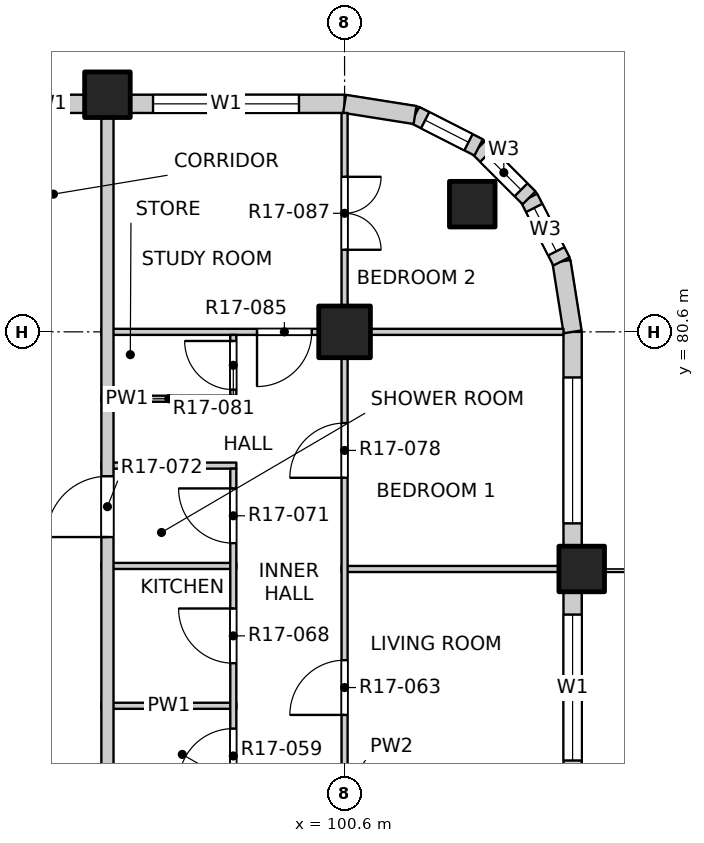
"""IFC4 building model, lengths in metres.
Left out: names, types, materials, properties, quantities, classifications, styles, units other than length and angle.
Written with IfcOpenShell. Run it as: python <this file> out.ifc"""

import sys

from ifc_helpers import new_model, si_unit, direction, frame, frame_2d, origin, origin_2d, place, context, subcontext, project, spatial, rectangle, extrude, element, fill, save


model = new_model("IFC4")
c1 = context("Model", 3, precision=1e-05, world=origin(), true_north=direction((0.0, 1.0)))
c2 = subcontext(c1, "Body", "Model", "MODEL_VIEW")
j1 = project(units=[si_unit("LENGTHUNIT", "METRE"), si_unit("PLANEANGLEUNIT", "RADIAN")], contexts=[c1])
p1 = place(None, origin())
s1 = spatial("IfcSite", under=j1, at=p1, CompositionType="ELEMENT")
p2 = place(p1, origin())
s2 = spatial("IfcBuilding", under=s1, at=p2, CompositionType="ELEMENT")
p3 = place(p2, frame((0.0, 0.0, 182.6)))
s3 = spatial("IfcBuildingStorey", under=s2, at=p3, CompositionType="ELEMENT", Elevation=182.6)
for number, where, z_axis, x_axis in (
    (1, (102.7, 82.7, -0.25), (0.0, 0.0, 1.0), (1.0, 0.0, 0.0)),
    (2, (104.5, 76.7, -0.25), (0.0, 0.0, 1.0), (1.0, 0.0, 0.0)),
    (3, (96.7, 84.5, -0.25), (0.0, 0.0, 1.0), (1.0, 0.0, 0.0)),
):
    element("IfcColumn", number, at=place(p3, frame(where, z_axis=z_axis, x_axis=x_axis)), inside=s3, PredefinedType="COLUMN", context=c2, shape_type="SweptSolid", body=[
        extrude(rectangle(XDim=0.75, YDim=0.75, at=origin_2d()), origin(), (0.0, 0.0, 1.0), 3.4),
    ])
p4 = place(p3, frame((100.6, 80.6, -0.25), z_axis=(0.0, 0.0, 1.0), x_axis=(1.0, 0.0, 0.0)))
e4 = element("IfcColumn", 4, at=p4, inside=s3, PredefinedType="COLUMN", context=c2, shape_type="SweptSolid", body=[
    extrude(rectangle(XDim=0.85, YDim=0.85, at=origin_2d()), origin(), (0.0, 0.0, 1.0), 3.4),
])
p5 = place(p3, frame((104.35, 69.275, 0.0), z_axis=(0.0, 0.0, 1.0), x_axis=(0.0, 1.0, 0.0)))
e5 = element("IfcWall", 5, at=p5, inside=s3, PredefinedType="SOLIDWALL", context=c2, shape_type="SweptSolid", body=[
    extrude(rectangle(XDim=7.05, YDim=0.3, at=frame_2d((3.525, 0.0))), origin(), (0.0, 0.0, 1.0), 2.7),
])
p6 = place(p5, frame((0.675, 0.0, 0.0)))
e6 = element("IfcOpeningElement", 6, at=p6, cuts=e5, PredefinedType="OPENING", context=c2, shape_type="SweptSolid", body=[
    extrude(rectangle(XDim=1.8, YDim=2.4, at=frame_2d((0.9, 1.2))), frame((0.0, 0.16, 0.0), z_axis=(0.0, -1.0, 0.0), x_axis=(1.0, 0.0, 0.0)), (0.0, 0.0, 1.0), 0.32),
])
p7 = place(p5, frame((4.275, 0.0, 0.9)))
e7 = element("IfcOpeningElement", 7, at=p7, cuts=e5, PredefinedType="OPENING", context=c2, shape_type="SweptSolid", body=[
    extrude(rectangle(XDim=2.4, YDim=1.8, at=frame_2d((1.2, 0.9))), frame((0.0, 0.16, 0.0), z_axis=(0.0, -1.0, 0.0), x_axis=(1.0, 0.0, 0.0)), (0.0, 0.0, 1.0), 0.32),
])
p8 = place(p3, frame((104.35, 77.075, 0.0), z_axis=(0.0, 0.0, 1.0), x_axis=(0.0, 1.0, 0.0)))
e8 = element("IfcWall", 8, at=p8, inside=s3, PredefinedType="SOLIDWALL", context=c2, shape_type="SweptSolid", body=[
    extrude(rectangle(XDim=3.525, YDim=0.3, at=frame_2d((1.763, 0.0))), origin(), (0.0, 0.0, 1.0), 2.7),
])
p9 = place(p8, frame((0.375, 0.0, 0.9)))
e9 = element("IfcOpeningElement", 9, at=p9, cuts=e8, PredefinedType="OPENING", context=c2, shape_type="SweptSolid", body=[
    extrude(rectangle(XDim=2.4, YDim=1.8, at=frame_2d((1.2, 0.9))), frame((0.0, 0.16, 0.0), z_axis=(0.0, -1.0, 0.0), x_axis=(1.0, 0.0, 0.0)), (0.0, 0.0, 1.0), 0.32),
])
p10 = place(p3, frame((95.025, 84.35, 0.0), z_axis=(0.0, 0.0, 1.0), x_axis=(1.0, 0.0, 0.0)))
e10 = element("IfcWall", 10, at=p10, inside=s3, PredefinedType="SOLIDWALL", context=c2, shape_type="SweptSolid", body=[
    extrude(rectangle(XDim=1.3, YDim=0.3, at=frame_2d((0.65, 0.0))), origin(), (0.0, 0.0, 1.0), 2.7),
])
p11 = place(p3, frame((97.075, 84.35, 0.0), z_axis=(0.0, 0.0, 1.0), x_axis=(1.0, 0.0, 0.0)))
e11 = element("IfcWall", 11, at=p11, inside=s3, PredefinedType="SOLIDWALL", context=c2, shape_type="SweptSolid", body=[
    extrude(rectangle(XDim=3.525, YDim=0.3, at=frame_2d((1.763, 0.0))), origin(), (0.0, 0.0, 1.0), 2.7),
])
p12 = place(p11, frame((0.375, 0.0, 0.9)))
e12 = element("IfcOpeningElement", 12, at=p12, cuts=e11, PredefinedType="OPENING", context=c2, shape_type="SweptSolid", body=[
    extrude(rectangle(XDim=2.4, YDim=1.8, at=frame_2d((1.2, 0.9))), frame((0.0, 0.16, 0.0), z_axis=(0.0, -1.0, 0.0), x_axis=(1.0, 0.0, 0.0)), (0.0, 0.0, 1.0), 0.32),
])
p13 = place(p3, frame((104.35, 80.6, 0.0), z_axis=(0.0, 0.0, 1.0), x_axis=(-0.156496880861, 0.987678452879, 0.0)))
e13 = element("IfcWall", 13, at=p13, inside=s3, PredefinedType="SOLIDWALL", context=c2, shape_type="SweptSolid", body=[
    extrude(rectangle(XDim=1.173, YDim=0.3, at=frame_2d((0.586, 0.0))), origin(), (0.0, 0.0, 1.0), 2.7),
])
p14 = place(p3, frame((104.167, 81.759, 0.0), z_axis=(0.0, 0.0, 1.0), x_axis=(-0.454025524128, 0.890988677504, 0.0)))
e14 = element("IfcWall", 14, at=p14, inside=s3, PredefinedType="SOLIDWALL", context=c2, shape_type="SweptSolid", body=[
    extrude(rectangle(XDim=1.173, YDim=0.3, at=frame_2d((0.587, 0.0))), origin(), (0.0, 0.0, 1.0), 2.7),
])
p15 = place(p14, frame((0.187, 0.0, 0.9)))
e15 = element("IfcOpeningElement", 15, at=p15, cuts=e14, PredefinedType="OPENING", context=c2, shape_type="SweptSolid", body=[
    extrude(rectangle(XDim=0.8, YDim=1.2, at=frame_2d((0.4, 0.6))), frame((0.0, 0.16, 0.0), z_axis=(0.0, -1.0, 0.0), x_axis=(1.0, 0.0, 0.0)), (0.0, 0.0, 1.0), 0.32),
])
p16 = place(p3, frame((103.634, 82.804, 0.0), z_axis=(0.0, 0.0, 1.0), x_axis=(-0.707106781187, 0.707106781187, 0.0)))
e16 = element("IfcWall", 16, at=p16, inside=s3, PredefinedType="SOLIDWALL", context=c2, shape_type="SweptSolid", body=[
    extrude(rectangle(XDim=1.173, YDim=0.3, at=frame_2d((0.586, 0.0))), origin(), (0.0, 0.0, 1.0), 2.7),
])
p17 = place(p16, frame((0.187, 0.0, 0.9)))
e17 = element("IfcOpeningElement", 17, at=p17, cuts=e16, PredefinedType="OPENING", context=c2, shape_type="SweptSolid", body=[
    extrude(rectangle(XDim=0.8, YDim=1.2, at=frame_2d((0.4, 0.6))), frame((0.0, 0.16, 0.0), z_axis=(0.0, -1.0, 0.0), x_axis=(1.0, 0.0, 0.0)), (0.0, 0.0, 1.0), 0.32),
])
p18 = place(p3, frame((102.804, 83.634, 0.0), z_axis=(0.0, 0.0, 1.0), x_axis=(-0.890988677504, 0.454025524128, 0.0)))
e18 = element("IfcWall", 18, at=p18, inside=s3, PredefinedType="SOLIDWALL", context=c2, shape_type="SweptSolid", body=[
    extrude(rectangle(XDim=1.173, YDim=0.3, at=frame_2d((0.587, 0.0))), origin(), (0.0, 0.0, 1.0), 2.7),
])
p19 = place(p18, frame((0.187, 0.0, 0.9)))
e19 = element("IfcOpeningElement", 19, at=p19, cuts=e18, PredefinedType="OPENING", context=c2, shape_type="SweptSolid", body=[
    extrude(rectangle(XDim=0.8, YDim=1.2, at=frame_2d((0.4, 0.6))), frame((0.0, 0.16, 0.0), z_axis=(0.0, -1.0, 0.0), x_axis=(1.0, 0.0, 0.0)), (0.0, 0.0, 1.0), 0.32),
])
p20 = place(p3, frame((101.759, 84.167, 0.0), z_axis=(0.0, 0.0, 1.0), x_axis=(-0.987678452879, 0.156496880861, 0.0)))
e20 = element("IfcWall", 20, at=p20, inside=s3, PredefinedType="SOLIDWALL", context=c2, shape_type="SweptSolid", body=[
    extrude(rectangle(XDim=1.173, YDim=0.3, at=frame_2d((0.586, 0.0))), origin(), (0.0, 0.0, 1.0), 2.7),
])
p21 = place(p3, frame((96.6, 74.45, 0.0), z_axis=(0.0, 0.0, 1.0), x_axis=(1.0, 0.0, 0.0)))
e21 = element("IfcWall", 21, at=p21, inside=s3, PredefinedType="PARTITIONING", context=c2, shape_type="SweptSolid", body=[
    extrude(rectangle(XDim=2.22, YDim=0.1, at=frame_2d((1.11, 0.0))), origin(), (0.0, 0.0, 1.0), 3.15),
])
p22 = place(p3, frame((100.55, 76.7, 0.0), z_axis=(0.0, 0.0, 1.0), x_axis=(1.0, 0.0, 0.0)))
e22 = element("IfcWall", 22, at=p22, inside=s3, PredefinedType="PARTITIONING", context=c2, shape_type="SweptSolid", body=[
    extrude(rectangle(XDim=3.65, YDim=0.1, at=frame_2d((1.825, 0.0))), origin(), (0.0, 0.0, 1.0), 2.55),
])
p23 = place(p3, frame((96.6, 76.75, 0.0), z_axis=(0.0, 0.0, 1.0), x_axis=(1.0, 0.0, 0.0)))
e23 = element("IfcWall", 23, at=p23, inside=s3, PredefinedType="PARTITIONING", context=c2, shape_type="SweptSolid", body=[
    extrude(rectangle(XDim=2.22, YDim=0.1, at=frame_2d((1.11, 0.0))), origin(), (0.0, 0.0, 1.0), 2.55),
])
for number, where, z_axis, x_axis in (
    (24, (96.6, 78.4, 0.0), (0.0, 0.0, 1.0), (1.0, 0.0, 0.0)),
    (25, (96.6, 79.5, 0.0), (0.0, 0.0, 1.0), (1.0, 0.0, 0.0)),
):
    element("IfcWall", number, at=place(p3, frame(where, z_axis=z_axis, x_axis=x_axis)), inside=s3, PredefinedType="PARTITIONING", context=c2, shape_type="SweptSolid", body=[
        extrude(rectangle(XDim=2.22, YDim=0.1, at=frame_2d((1.11, 0.0))), origin(), (0.0, 0.0, 1.0), 3.15),
    ])
p24 = place(p3, frame((96.6, 80.6, 0.0), z_axis=(0.0, 0.0, 1.0), x_axis=(1.0, 0.0, 0.0)))
e26 = element("IfcWall", 26, at=p24, inside=s3, PredefinedType="PARTITIONING", context=c2, shape_type="SweptSolid", body=[
    extrude(rectangle(XDim=7.6, YDim=0.1, at=frame_2d((3.8, 0.0))), origin(), (0.0, 0.0, 1.0), 3.15),
])
p25 = place(p24, frame((2.56, 0.0, 0.0)))
e27 = element("IfcOpeningElement", 27, at=p25, cuts=e26, PredefinedType="OPENING", context=c2, shape_type="SweptSolid", body=[
    extrude(rectangle(XDim=0.9, YDim=2.1, at=frame_2d((0.45, 1.05))), frame((0.0, 0.06, 0.0), z_axis=(0.0, -1.0, 0.0), x_axis=(1.0, 0.0, 0.0)), (0.0, 0.0, 1.0), 0.12),
])
p26 = place(p3, frame((96.7, 49.5, 0.0), z_axis=(0.0, 0.0, 1.0), x_axis=(0.0, 1.0, 0.0)))
e28 = element("IfcWall", 28, at=p26, inside=s3, PredefinedType="PARTITIONING", context=c2, shape_type="SweptSolid", body=[
    extrude(rectangle(XDim=34.7, YDim=0.2, at=frame_2d((17.35, 0.0))), origin(), (0.0, 0.0, 1.0), 3.15),
])
p27 = place(p26, frame((6.875, 0.0, 0.0)))
e29 = element("IfcOpeningElement", 29, at=p27, cuts=e28, PredefinedType="OPENING", context=c2, shape_type="SweptSolid", body=[
    extrude(rectangle(XDim=1.0, YDim=2.1, at=frame_2d((0.5, 1.05))), frame((0.0, 0.11, 0.0), z_axis=(0.0, -1.0, 0.0), x_axis=(1.0, 0.0, 0.0)), (0.0, 0.0, 1.0), 0.22),
])
p28 = place(p26, frame((21.775, 0.0, 0.0)))
e30 = element("IfcOpeningElement", 30, at=p28, cuts=e28, PredefinedType="OPENING", context=c2, shape_type="SweptSolid", body=[
    extrude(rectangle(XDim=1.0, YDim=2.1, at=frame_2d((0.5, 1.05))), frame((0.0, 0.11, 0.0), z_axis=(0.0, -1.0, 0.0), x_axis=(1.0, 0.0, 0.0)), (0.0, 0.0, 1.0), 0.22),
])
p29 = place(p26, frame((27.725, 0.0, 0.0)))
e31 = element("IfcOpeningElement", 31, at=p29, cuts=e28, PredefinedType="OPENING", context=c2, shape_type="SweptSolid", body=[
    extrude(rectangle(XDim=1.0, YDim=2.1, at=frame_2d((0.5, 1.05))), frame((0.0, 0.11, 0.0), z_axis=(0.0, -1.0, 0.0), x_axis=(1.0, 0.0, 0.0)), (0.0, 0.0, 1.0), 0.22),
])
p30 = place(p3, frame((98.77, 71.15, 0.0), z_axis=(0.0, 0.0, 1.0), x_axis=(0.0, 1.0, 0.0)))
e32 = element("IfcWall", 32, at=p30, inside=s3, PredefinedType="PARTITIONING", context=c2, shape_type="SweptSolid", body=[
    extrude(rectangle(XDim=7.2, YDim=0.1, at=frame_2d((3.6, 0.0))), origin(), (0.0, 0.0, 1.0), 3.15),
])
p31 = place(p30, frame((0.4, 0.0, 0.0)))
e33 = element("IfcOpeningElement", 33, at=p31, cuts=e32, PredefinedType="OPENING", context=c2, shape_type="SweptSolid", body=[
    extrude(rectangle(XDim=0.8, YDim=2.1, at=frame_2d((0.4, 1.05))), frame((0.0, 0.06, 0.0), z_axis=(0.0, -1.0, 0.0), x_axis=(1.0, 0.0, 0.0)), (0.0, 0.0, 1.0), 0.12),
])
p32 = place(p30, frame((2.025, 0.0, 0.0)))
e34 = element("IfcOpeningElement", 34, at=p32, cuts=e32, PredefinedType="OPENING", context=c2, shape_type="SweptSolid", body=[
    extrude(rectangle(XDim=0.9, YDim=2.1, at=frame_2d((0.45, 1.05))), frame((0.0, 0.06, 0.0), z_axis=(0.0, -1.0, 0.0), x_axis=(1.0, 0.0, 0.0)), (0.0, 0.0, 1.0), 0.12),
])
p33 = place(p30, frame((4.0, 0.0, 0.0)))
e35 = element("IfcOpeningElement", 35, at=p33, cuts=e32, PredefinedType="OPENING", context=c2, shape_type="SweptSolid", body=[
    extrude(rectangle(XDim=0.9, YDim=2.1, at=frame_2d((0.45, 1.05))), frame((0.0, 0.06, 0.0), z_axis=(0.0, -1.0, 0.0), x_axis=(1.0, 0.0, 0.0)), (0.0, 0.0, 1.0), 0.12),
])
p34 = place(p30, frame((5.975, 0.0, 0.0)))
e36 = element("IfcOpeningElement", 36, at=p34, cuts=e32, PredefinedType="OPENING", context=c2, shape_type="SweptSolid", body=[
    extrude(rectangle(XDim=0.9, YDim=2.1, at=frame_2d((0.45, 1.05))), frame((0.0, 0.06, 0.0), z_axis=(0.0, -1.0, 0.0), x_axis=(1.0, 0.0, 0.0)), (0.0, 0.0, 1.0), 0.12),
])
p35 = place(p3, frame((98.77, 79.55, 0.0), z_axis=(0.0, 0.0, 1.0), x_axis=(0.0, 1.0, 0.0)))
e37 = element("IfcWall", 37, at=p35, inside=s3, PredefinedType="PARTITIONING", context=c2, shape_type="SweptSolid", body=[
    extrude(rectangle(XDim=1.0, YDim=0.1, at=frame_2d((0.5, 0.0))), origin(), (0.0, 0.0, 1.0), 3.15),
])
p36 = place(p35, frame((0.1, 0.0, 0.0)))
e38 = element("IfcOpeningElement", 38, at=p36, cuts=e37, PredefinedType="OPENING", context=c2, shape_type="SweptSolid", body=[
    extrude(rectangle(XDim=0.8, YDim=2.1, at=frame_2d((0.4, 1.05))), frame((0.0, 0.06, 0.0), z_axis=(0.0, -1.0, 0.0), x_axis=(1.0, 0.0, 0.0)), (0.0, 0.0, 1.0), 0.12),
])
p37 = place(p3, frame((100.6, 45.8, 0.0), z_axis=(0.0, 0.0, 1.0), x_axis=(0.0, 1.0, 0.0)))
e39 = element("IfcWall", 39, at=p37, inside=s3, PredefinedType="PARTITIONING", context=c2, shape_type="SweptSolid", body=[
    extrude(rectangle(XDim=38.4, YDim=0.1, at=frame_2d((19.2, 0.0))), origin(), (0.0, 0.0, 1.0), 3.15),
])
p38 = place(p37, frame((1.05, 0.0, 0.0)))
e40 = element("IfcOpeningElement", 40, at=p38, cuts=e39, PredefinedType="OPENING", context=c2, shape_type="SweptSolid", body=[
    extrude(rectangle(XDim=1.2, YDim=2.1, at=frame_2d((0.6, 1.05))), frame((0.0, 0.06, 0.0), z_axis=(0.0, -1.0, 0.0), x_axis=(1.0, 0.0, 0.0)), (0.0, 0.0, 1.0), 0.12),
])
p39 = place(p37, frame((5.1, 0.0, 0.0)))
e41 = element("IfcOpeningElement", 41, at=p39, cuts=e39, PredefinedType="OPENING", context=c2, shape_type="SweptSolid", body=[
    extrude(rectangle(XDim=0.9, YDim=2.1, at=frame_2d((0.45, 1.05))), frame((0.0, 0.06, 0.0), z_axis=(0.0, -1.0, 0.0), x_axis=(1.0, 0.0, 0.0)), (0.0, 0.0, 1.0), 0.12),
])
p40 = place(p37, frame((9.0, 0.0, 0.0)))
e42 = element("IfcOpeningElement", 42, at=p40, cuts=e39, PredefinedType="OPENING", context=c2, shape_type="SweptSolid", body=[
    extrude(rectangle(XDim=0.9, YDim=2.1, at=frame_2d((0.45, 1.05))), frame((0.0, 0.06, 0.0), z_axis=(0.0, -1.0, 0.0), x_axis=(1.0, 0.0, 0.0)), (0.0, 0.0, 1.0), 0.12),
])
p41 = place(p37, frame((12.9, 0.0, 0.0)))
e43 = element("IfcOpeningElement", 43, at=p41, cuts=e39, PredefinedType="OPENING", context=c2, shape_type="SweptSolid", body=[
    extrude(rectangle(XDim=0.9, YDim=2.1, at=frame_2d((0.45, 1.05))), frame((0.0, 0.06, 0.0), z_axis=(0.0, -1.0, 0.0), x_axis=(1.0, 0.0, 0.0)), (0.0, 0.0, 1.0), 0.12),
])
p42 = place(p37, frame((19.725, 0.0, 0.0)))
e44 = element("IfcOpeningElement", 44, at=p42, cuts=e39, PredefinedType="OPENING", context=c2, shape_type="SweptSolid", body=[
    extrude(rectangle(XDim=1.2, YDim=2.1, at=frame_2d((0.6, 1.05))), frame((0.0, 0.06, 0.0), z_axis=(0.0, -1.0, 0.0), x_axis=(1.0, 0.0, 0.0)), (0.0, 0.0, 1.0), 0.12),
])
p43 = place(p37, frame((24.6, 0.0, 0.0)))
e45 = element("IfcOpeningElement", 45, at=p43, cuts=e39, PredefinedType="OPENING", context=c2, shape_type="SweptSolid", body=[
    extrude(rectangle(XDim=0.9, YDim=2.1, at=frame_2d((0.45, 1.05))), frame((0.0, 0.06, 0.0), z_axis=(0.0, -1.0, 0.0), x_axis=(1.0, 0.0, 0.0)), (0.0, 0.0, 1.0), 0.12),
])
p44 = place(p37, frame((28.5, 0.0, 0.0)))
e46 = element("IfcOpeningElement", 46, at=p44, cuts=e39, PredefinedType="OPENING", context=c2, shape_type="SweptSolid", body=[
    extrude(rectangle(XDim=0.9, YDim=2.1, at=frame_2d((0.45, 1.05))), frame((0.0, 0.06, 0.0), z_axis=(0.0, -1.0, 0.0), x_axis=(1.0, 0.0, 0.0)), (0.0, 0.0, 1.0), 0.12),
])
p45 = place(p37, frame((32.4, 0.0, 0.0)))
e47 = element("IfcOpeningElement", 47, at=p45, cuts=e39, PredefinedType="OPENING", context=c2, shape_type="SweptSolid", body=[
    extrude(rectangle(XDim=0.9, YDim=2.1, at=frame_2d((0.45, 1.05))), frame((0.0, 0.06, 0.0), z_axis=(0.0, -1.0, 0.0), x_axis=(1.0, 0.0, 0.0)), (0.0, 0.0, 1.0), 0.12),
])
p46 = place(p37, frame((36.15, 0.0, 0.0)))
e48 = element("IfcOpeningElement", 48, at=p46, cuts=e39, PredefinedType="OPENING", context=c2, shape_type="SweptSolid", body=[
    extrude(rectangle(XDim=1.2, YDim=2.1, at=frame_2d((0.6, 1.05))), frame((0.0, 0.06, 0.0), z_axis=(0.0, -1.0, 0.0), x_axis=(1.0, 0.0, 0.0)), (0.0, 0.0, 1.0), 0.12),
])
p47 = place(p7, origin())
e49 = element("IfcWindow", 49, at=p47, inside=s3, PartitioningType="DOUBLE_PANEL_VERTICAL", PredefinedType="WINDOW", context=c2, shape_type="SweptSolid", body=[
    extrude(rectangle(XDim=2.4, YDim=1.8, at=frame_2d((1.2, 0.9))), frame((0.0, 0.03, 0.0), z_axis=(0.0, -1.0, 0.0), x_axis=(1.0, 0.0, 0.0)), (0.0, 0.0, 1.0), 0.06),
])
fill(e7, e49)
p48 = place(p9, origin())
e50 = element("IfcWindow", 50, at=p48, inside=s3, PartitioningType="DOUBLE_PANEL_VERTICAL", PredefinedType="WINDOW", context=c2, shape_type="SweptSolid", body=[
    extrude(rectangle(XDim=2.4, YDim=1.8, at=frame_2d((1.2, 0.9))), frame((0.0, 0.03, 0.0), z_axis=(0.0, -1.0, 0.0), x_axis=(1.0, 0.0, 0.0)), (0.0, 0.0, 1.0), 0.06),
])
fill(e9, e50)
p49 = place(p12, origin())
e51 = element("IfcWindow", 51, at=p49, inside=s3, PartitioningType="DOUBLE_PANEL_VERTICAL", PredefinedType="WINDOW", context=c2, shape_type="SweptSolid", body=[
    extrude(rectangle(XDim=2.4, YDim=1.8, at=frame_2d((1.2, 0.9))), frame((0.0, 0.03, 0.0), z_axis=(0.0, -1.0, 0.0), x_axis=(1.0, 0.0, 0.0)), (0.0, 0.0, 1.0), 0.06),
])
fill(e12, e51)
p50 = place(p15, origin())
e52 = element("IfcWindow", 52, at=p50, inside=s3, PartitioningType="SINGLE_PANEL", PredefinedType="WINDOW", context=c2, shape_type="SweptSolid", body=[
    extrude(rectangle(XDim=0.8, YDim=1.2, at=frame_2d((0.4, 0.6))), frame((0.0, 0.03, 0.0), z_axis=(0.0, -1.0, 0.0), x_axis=(1.0, 0.0, 0.0)), (0.0, 0.0, 1.0), 0.06),
])
fill(e15, e52)
p51 = place(p17, origin())
e53 = element("IfcWindow", 53, at=p51, inside=s3, PartitioningType="SINGLE_PANEL", PredefinedType="WINDOW", context=c2, shape_type="SweptSolid", body=[
    extrude(rectangle(XDim=0.8, YDim=1.2, at=frame_2d((0.4, 0.6))), frame((0.0, 0.03, 0.0), z_axis=(0.0, -1.0, 0.0), x_axis=(1.0, 0.0, 0.0)), (0.0, 0.0, 1.0), 0.06),
])
fill(e17, e53)
p52 = place(p19, origin())
e54 = element("IfcWindow", 54, at=p52, inside=s3, PartitioningType="SINGLE_PANEL", PredefinedType="WINDOW", context=c2, shape_type="SweptSolid", body=[
    extrude(rectangle(XDim=0.8, YDim=1.2, at=frame_2d((0.4, 0.6))), frame((0.0, 0.03, 0.0), z_axis=(0.0, -1.0, 0.0), x_axis=(1.0, 0.0, 0.0)), (0.0, 0.0, 1.0), 0.06),
])
fill(e19, e54)
p53 = place(p32, origin())
e55 = element("IfcDoor", 55, at=p53, inside=s3, OperationType="SINGLE_SWING_LEFT", PredefinedType="DOOR", context=c2, shape_type="SweptSolid", body=[
    extrude(rectangle(XDim=0.9, YDim=2.1, at=frame_2d((0.45, 1.05))), frame((0.0, 0.025, 0.0), z_axis=(0.0, -1.0, 0.0), x_axis=(1.0, 0.0, 0.0)), (0.0, 0.0, 1.0), 0.05),
])
fill(e34, e55)
p54 = place(p44, origin())
e56 = element("IfcDoor", 56, at=p54, inside=s3, OperationType="SINGLE_SWING_LEFT", PredefinedType="DOOR", context=c2, shape_type="SweptSolid", body=[
    extrude(rectangle(XDim=0.9, YDim=2.1, at=frame_2d((0.45, 1.05))), frame((0.0, 0.025, 0.0), z_axis=(0.0, -1.0, 0.0), x_axis=(1.0, 0.0, 0.0)), (0.0, 0.0, 1.0), 0.05),
])
fill(e46, e56)
p55 = place(p33, origin())
e57 = element("IfcDoor", 57, at=p55, inside=s3, OperationType="SINGLE_SWING_RIGHT", PredefinedType="DOOR", context=c2, shape_type="SweptSolid", body=[
    extrude(rectangle(XDim=0.9, YDim=2.1, at=frame_2d((0.45, 1.05))), frame((0.0, 0.025, 0.0), z_axis=(0.0, -1.0, 0.0), x_axis=(1.0, 0.0, 0.0)), (0.0, 0.0, 1.0), 0.05),
])
fill(e35, e57)
p56 = place(p34, origin())
e58 = element("IfcDoor", 58, at=p56, inside=s3, OperationType="SINGLE_SWING_RIGHT", PredefinedType="DOOR", context=c2, shape_type="SweptSolid", body=[
    extrude(rectangle(XDim=0.9, YDim=2.1, at=frame_2d((0.45, 1.05))), frame((0.0, 0.025, 0.0), z_axis=(0.0, -1.0, 0.0), x_axis=(1.0, 0.0, 0.0)), (0.0, 0.0, 1.0), 0.05),
])
fill(e36, e58)
p57 = place(p29, origin())
e59 = element("IfcDoor", 59, at=p57, inside=s3, OperationType="SINGLE_SWING_RIGHT", PredefinedType="DOOR", context=c2, shape_type="SweptSolid", body=[
    extrude(rectangle(XDim=1.0, YDim=2.1, at=frame_2d((0.5, 1.05))), frame((0.0, 0.025, 0.0), z_axis=(0.0, -1.0, 0.0), x_axis=(1.0, 0.0, 0.0)), (0.0, 0.0, 1.0), 0.05),
])
fill(e31, e59)
p58 = place(p45, origin())
e60 = element("IfcDoor", 60, at=p58, inside=s3, OperationType="SINGLE_SWING_LEFT", PredefinedType="DOOR", context=c2, shape_type="SweptSolid", body=[
    extrude(rectangle(XDim=0.9, YDim=2.1, at=frame_2d((0.45, 1.05))), frame((0.0, 0.025, 0.0), z_axis=(0.0, -1.0, 0.0), x_axis=(1.0, 0.0, 0.0)), (0.0, 0.0, 1.0), 0.05),
])
fill(e47, e60)
p59 = place(p36, origin())
e61 = element("IfcDoor", 61, at=p59, inside=s3, OperationType="SINGLE_SWING_RIGHT", PredefinedType="DOOR", context=c2, shape_type="SweptSolid", body=[
    extrude(rectangle(XDim=0.8, YDim=2.1, at=frame_2d((0.4, 1.05))), frame((0.0, 0.025, 0.0), z_axis=(0.0, -1.0, 0.0), x_axis=(1.0, 0.0, 0.0)), (0.0, 0.0, 1.0), 0.05),
])
fill(e38, e61)
p60 = place(p25, origin())
e62 = element("IfcDoor", 62, at=p60, inside=s3, OperationType="SINGLE_SWING_RIGHT", PredefinedType="DOOR", context=c2, shape_type="SweptSolid", body=[
    extrude(rectangle(XDim=0.9, YDim=2.1, at=frame_2d((0.45, 1.05))), frame((0.0, 0.025, 0.0), z_axis=(0.0, -1.0, 0.0), x_axis=(1.0, 0.0, 0.0)), (0.0, 0.0, 1.0), 0.05),
])
fill(e27, e62)
p61 = place(p46, origin())
e63 = element("IfcDoor", 63, at=p61, inside=s3, OperationType="DOUBLE_DOOR_SINGLE_SWING", PredefinedType="DOOR", context=c2, shape_type="SweptSolid", body=[
    extrude(rectangle(XDim=1.2, YDim=2.1, at=frame_2d((0.6, 1.05))), frame((0.0, 0.025, 0.0), z_axis=(0.0, -1.0, 0.0), x_axis=(1.0, 0.0, 0.0)), (0.0, 0.0, 1.0), 0.05),
])
fill(e48, e63)
save(model, sys.argv[1])
